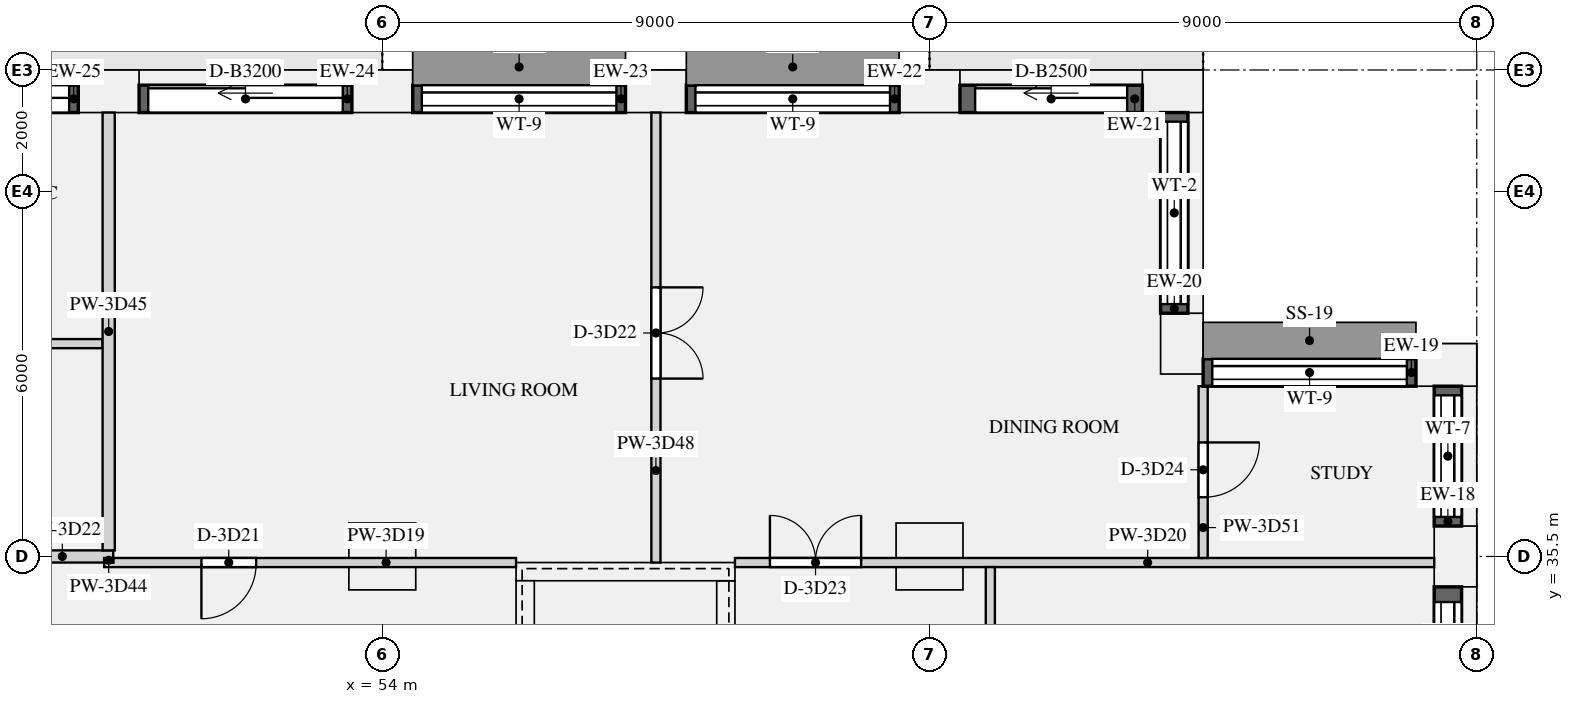
"""IFC4 building model, lengths in metres.
Left out: names, types, materials, properties, quantities, classifications, styles, units other than length and angle.
Written with IfcOpenShell. Run it as: python <this file> out.ifc"""

import sys

from ifc_helpers import new_model, si_unit, direction, frame, frame_2d, origin, origin_2d, place, context, subcontext, project, spatial, rectangle, extrude, element, fill, save


model = new_model("IFC4")
c1 = context("Model", 3, precision=1e-05, world=origin(), true_north=direction((0.0, 1.0)))
c2 = subcontext(c1, "Body", "Model", "MODEL_VIEW")
j1 = project(units=[si_unit("LENGTHUNIT", "METRE"), si_unit("PLANEANGLEUNIT", "RADIAN")], contexts=[c1])
p1 = place(None, origin())
s1 = spatial("IfcSite", under=j1, at=p1, CompositionType="ELEMENT")
p2 = place(p1, origin())
s2 = spatial("IfcBuilding", under=s1, at=p2, CompositionType="ELEMENT")
p3 = place(p2, frame((0.0, 0.0, 166.5)))
s3 = spatial("IfcBuildingStorey", under=s2, at=p3, CompositionType="ELEMENT", Elevation=166.5)
for number, where, z_axis, x_axis in (
    (1, (71.65, 35.5, 0.0), (0.0, 0.0, 1.0), (0.0, 1.0, 0.0)),
    (2, (71.5, 38.65, 0.0), (0.0, 0.0, 1.0), (-1.0, 0.0, 0.0)),
    (3, (67.15, 39.0, 0.0), (0.0, 0.0, 1.0), (0.0, 1.0, 0.0)),
    (4, (67.0, 43.15, 0.0), (0.0, 0.0, 1.0), (-1.0, 0.0, 0.0)),
    (5, (63.0, 43.15, 0.0), (0.0, 0.0, 1.0), (-1.0, 0.0, 0.0)),
    (6, (58.5, 43.15, 0.0), (0.0, 0.0, 1.0), (-1.0, 0.0, 0.0)),
    (7, (54.0, 43.15, 0.0), (0.0, 0.0, 1.0), (-1.0, 0.0, 0.0)),
    (8, (49.5, 43.15, 0.0), (0.0, 0.0, 1.0), (-1.0, 0.0, 0.0)),
):
    element("IfcColumn", number, at=place(p3, frame(where, z_axis=z_axis, x_axis=x_axis)), inside=s3, PredefinedType="USERDEFINED", context=c2, shape_type="SweptSolid", body=[
        extrude(rectangle(XDim=1.0, YDim=0.7, at=origin_2d()), origin(), (0.0, 0.0, 1.0), 3.15),
    ])
for number, where, z_axis, x_axis in (
    (9, (54.0, 35.5, 0.0), (0.0, 0.0, 1.0), (1.0, 0.0, 0.0)),
    (10, (63.0, 35.5, 0.0), (0.0, 0.0, 1.0), (1.0, 0.0, 0.0)),
):
    element("IfcColumn", number, at=place(p3, frame(where, z_axis=z_axis, x_axis=x_axis)), inside=s3, PredefinedType="COLUMN", context=c2, shape_type="SweptSolid", body=[
        extrude(rectangle(XDim=1.1, YDim=1.1, at=origin_2d()), origin(), (0.0, 0.0, 1.0), 3.15),
    ])
p4 = place(p3, frame((56.2, 35.25, 0.0), z_axis=(0.0, 0.0, 1.0), x_axis=(1.0, 0.0, 0.0)))
e11 = element("IfcWall", 11, at=p4, inside=s3, PredefinedType="SHEAR", context=c2, shape_type="SweptSolid", body=[
    extrude(rectangle(XDim=3.6, YDim=0.3, at=frame_2d((1.8, 0.0))), origin(), (0.0, 0.0, 1.0), 3.15),
])
for number, where, z_axis, x_axis in (
    (12, (56.35, 27.3, 0.0), (0.0, 0.0, 1.0), (0.0, 1.0, 0.0)),
    (13, (59.65, 27.3, 0.0), (0.0, 0.0, 1.0), (0.0, 1.0, 0.0)),
):
    element("IfcWall", number, at=place(p3, frame(where, z_axis=z_axis, x_axis=x_axis)), inside=s3, PredefinedType="SHEAR", context=c2, shape_type="SweptSolid", body=[
        extrude(rectangle(XDim=7.8, YDim=0.3, at=frame_2d((3.9, 0.0))), origin(), (0.0, 0.0, 1.0), 3.15),
    ])
p5 = place(p3, frame((71.525, 32.5, 0.9), z_axis=(0.0, 0.0, 1.0), x_axis=(0.0, 1.0, 0.0)))
e14 = element("IfcWall", 14, at=p5, inside=s3, PredefinedType="SOLIDWALL", context=c2, shape_type="SweptSolid", body=[
    extrude(rectangle(XDim=2.5, YDim=0.45, at=frame_2d((1.25, 0.0))), origin(), (0.0, 0.0, 1.0), 1.93),
])
p6 = place(p5, frame((0.25, 0.0, 0.15)))
e15 = element("IfcOpeningElement", 15, at=p6, cuts=e14, PredefinedType="OPENING", context=c2, shape_type="SweptSolid", body=[
    extrude(rectangle(XDim=2.0, YDim=1.5, at=frame_2d((1.0, 0.75))), frame((0.0, 0.235, 0.0), z_axis=(0.0, -1.0, 0.0), x_axis=(1.0, 0.0, 0.0)), (0.0, 0.0, 1.0), 0.47),
])
p7 = place(p3, frame((71.525, 36.0, 0.9), z_axis=(0.0, 0.0, 1.0), x_axis=(0.0, 1.0, 0.0)))
e16 = element("IfcWall", 16, at=p7, inside=s3, PredefinedType="SOLIDWALL", context=c2, shape_type="SweptSolid", body=[
    extrude(rectangle(XDim=2.3, YDim=0.45, at=frame_2d((1.15, 0.0))), origin(), (0.0, 0.0, 1.0), 1.93),
])
p8 = place(p7, frame((0.15, 0.0, 0.15)))
e17 = element("IfcOpeningElement", 17, at=p8, cuts=e16, PredefinedType="OPENING", context=c2, shape_type="SweptSolid", body=[
    extrude(rectangle(XDim=2.0, YDim=1.5, at=frame_2d((1.0, 0.75))), frame((0.0, 0.235, 0.0), z_axis=(0.0, -1.0, 0.0), x_axis=(1.0, 0.0, 0.0)), (0.0, 0.0, 1.0), 0.47),
])
p9 = place(p3, frame((71.0, 38.525, 0.9), z_axis=(0.0, 0.0, 1.0), x_axis=(-1.0, 0.0, 0.0)))
e18 = element("IfcWall", 18, at=p9, inside=s3, PredefinedType="SOLIDWALL", context=c2, shape_type="SweptSolid", body=[
    extrude(rectangle(XDim=3.5, YDim=0.45, at=frame_2d((1.75, 0.0))), origin(), (0.0, 0.0, 1.0), 1.93),
])
p10 = place(p9, frame((0.15, 0.0, 0.15)))
e19 = element("IfcOpeningElement", 19, at=p10, cuts=e18, PredefinedType="OPENING", context=c2, shape_type="SweptSolid", body=[
    extrude(rectangle(XDim=3.2, YDim=1.5, at=frame_2d((1.6, 0.75))), frame((0.0, 0.235, 0.0), z_axis=(0.0, -1.0, 0.0), x_axis=(1.0, 0.0, 0.0)), (0.0, 0.0, 1.0), 0.47),
])
p11 = place(p3, frame((67.025, 39.5, 0.9), z_axis=(0.0, 0.0, 1.0), x_axis=(0.0, 1.0, 0.0)))
e20 = element("IfcWall", 20, at=p11, inside=s3, PredefinedType="SOLIDWALL", context=c2, shape_type="SweptSolid", body=[
    extrude(rectangle(XDim=3.3, YDim=0.45, at=frame_2d((1.65, 0.0))), origin(), (0.0, 0.0, 1.0), 1.93),
])
p12 = place(p11, frame((0.15, 0.0, 0.15)))
e21 = element("IfcOpeningElement", 21, at=p12, cuts=e20, PredefinedType="OPENING", context=c2, shape_type="SweptSolid", body=[
    extrude(rectangle(XDim=3.0, YDim=1.5, at=frame_2d((1.5, 0.75))), frame((0.0, 0.235, 0.0), z_axis=(0.0, -1.0, 0.0), x_axis=(1.0, 0.0, 0.0)), (0.0, 0.0, 1.0), 0.47),
])
p13 = place(p3, frame((66.5, 43.025, 0.0), z_axis=(0.0, 0.0, 1.0), x_axis=(-1.0, 0.0, 0.0)))
e22 = element("IfcWall", 22, at=p13, inside=s3, PredefinedType="SOLIDWALL", context=c2, shape_type="SweptSolid", body=[
    extrude(rectangle(XDim=3.0, YDim=0.45, at=frame_2d((1.5, 0.0))), origin(), (0.0, 0.0, 1.0), 2.83),
])
p14 = place(p13, frame((0.25, 0.0, 0.0)))
e23 = element("IfcOpeningElement", 23, at=p14, cuts=e22, PredefinedType="OPENING", context=c2, shape_type="SweptSolid", body=[
    extrude(rectangle(XDim=2.5, YDim=2.3, at=frame_2d((1.25, 1.15))), frame((0.0, 0.235, 0.0), z_axis=(0.0, -1.0, 0.0), x_axis=(1.0, 0.0, 0.0)), (0.0, 0.0, 1.0), 0.47),
])
p15 = place(p3, frame((62.5, 43.025, 0.9), z_axis=(0.0, 0.0, 1.0), x_axis=(-1.0, 0.0, 0.0)))
e24 = element("IfcWall", 24, at=p15, inside=s3, PredefinedType="SOLIDWALL", context=c2, shape_type="SweptSolid", body=[
    extrude(rectangle(XDim=3.5, YDim=0.45, at=frame_2d((1.75, 0.0))), origin(), (0.0, 0.0, 1.0), 1.93),
])
p16 = place(p15, frame((0.15, 0.0, 0.15)))
e25 = element("IfcOpeningElement", 25, at=p16, cuts=e24, PredefinedType="OPENING", context=c2, shape_type="SweptSolid", body=[
    extrude(rectangle(XDim=3.2, YDim=1.5, at=frame_2d((1.6, 0.75))), frame((0.0, 0.235, 0.0), z_axis=(0.0, -1.0, 0.0), x_axis=(1.0, 0.0, 0.0)), (0.0, 0.0, 1.0), 0.47),
])
p17 = place(p3, frame((58.0, 43.025, 0.9), z_axis=(0.0, 0.0, 1.0), x_axis=(-1.0, 0.0, 0.0)))
e26 = element("IfcWall", 26, at=p17, inside=s3, PredefinedType="SOLIDWALL", context=c2, shape_type="SweptSolid", body=[
    extrude(rectangle(XDim=3.5, YDim=0.45, at=frame_2d((1.75, 0.0))), origin(), (0.0, 0.0, 1.0), 1.93),
])
p18 = place(p17, frame((0.15, 0.0, 0.15)))
e27 = element("IfcOpeningElement", 27, at=p18, cuts=e26, PredefinedType="OPENING", context=c2, shape_type="SweptSolid", body=[
    extrude(rectangle(XDim=3.2, YDim=1.5, at=frame_2d((1.6, 0.75))), frame((0.0, 0.235, 0.0), z_axis=(0.0, -1.0, 0.0), x_axis=(1.0, 0.0, 0.0)), (0.0, 0.0, 1.0), 0.47),
])
p19 = place(p3, frame((53.5, 43.025, 0.0), z_axis=(0.0, 0.0, 1.0), x_axis=(-1.0, 0.0, 0.0)))
e28 = element("IfcWall", 28, at=p19, inside=s3, PredefinedType="SOLIDWALL", context=c2, shape_type="SweptSolid", body=[
    extrude(rectangle(XDim=3.5, YDim=0.45, at=frame_2d((1.75, 0.0))), origin(), (0.0, 0.0, 1.0), 2.83),
])
p20 = place(p19, frame((0.15, 0.0, 0.0)))
e29 = element("IfcOpeningElement", 29, at=p20, cuts=e28, PredefinedType="OPENING", context=c2, shape_type="SweptSolid", body=[
    extrude(rectangle(XDim=3.2, YDim=2.3, at=frame_2d((1.6, 1.15))), frame((0.0, 0.235, 0.0), z_axis=(0.0, -1.0, 0.0), x_axis=(1.0, 0.0, 0.0)), (0.0, 0.0, 1.0), 0.47),
])
p21 = place(p3, frame((49.0, 43.025, 0.0), z_axis=(0.0, 0.0, 1.0), x_axis=(-1.0, 0.0, 0.0)))
e30 = element("IfcWall", 30, at=p21, inside=s3, PredefinedType="SOLIDWALL", context=c2, shape_type="SweptSolid", body=[
    extrude(rectangle(XDim=3.5, YDim=0.45, at=frame_2d((1.75, 0.0))), origin(), (0.0, 0.0, 1.0), 2.83),
])
p22 = place(p21, frame((0.15, 0.0, 0.0)))
e31 = element("IfcOpeningElement", 31, at=p22, cuts=e30, PredefinedType="OPENING", context=c2, shape_type="SweptSolid", body=[
    extrude(rectangle(XDim=3.2, YDim=2.3, at=frame_2d((1.6, 1.15))), frame((0.0, 0.235, 0.0), z_axis=(0.0, -1.0, 0.0), x_axis=(1.0, 0.0, 0.0)), (0.0, 0.0, 1.0), 0.47),
])
p23 = place(p3, frame((49.425, 35.4, 0.0), z_axis=(0.0, 0.0, 1.0), x_axis=(1.0, 0.0, 0.0)))
e32 = element("IfcWall", 32, at=p23, inside=s3, PredefinedType="PARTITIONING", context=c2, shape_type="SweptSolid", body=[
    extrude(rectangle(XDim=6.775, YDim=0.15, at=frame_2d((3.387, 0.0))), origin(), (0.0, 0.0, 1.0), 2.83),
])
p24 = place(p23, frame((1.6, 0.0, 0.0)))
e33 = element("IfcOpeningElement", 33, at=p24, cuts=e32, PredefinedType="OPENING", context=c2, shape_type="SweptSolid", body=[
    extrude(rectangle(XDim=0.9, YDim=2.1, at=frame_2d((0.45, 1.05))), frame((0.0, 0.085, 0.0), z_axis=(0.0, -1.0, 0.0), x_axis=(1.0, 0.0, 0.0)), (0.0, 0.0, 1.0), 0.17),
])
p25 = place(p3, frame((59.8, 35.4, 0.0), z_axis=(0.0, 0.0, 1.0), x_axis=(1.0, 0.0, 0.0)))
e34 = element("IfcWall", 34, at=p25, inside=s3, PredefinedType="PARTITIONING", context=c2, shape_type="SweptSolid", body=[
    extrude(rectangle(XDim=11.5, YDim=0.15, at=frame_2d((5.75, 0.0))), origin(), (0.0, 0.0, 1.0), 2.83),
])
p26 = place(p25, frame((0.575, 0.0, 0.0)))
e35 = element("IfcOpeningElement", 35, at=p26, cuts=e34, PredefinedType="OPENING", context=c2, shape_type="SweptSolid", body=[
    extrude(rectangle(XDim=1.5, YDim=2.1, at=frame_2d((0.75, 1.05))), frame((0.0, 0.085, 0.0), z_axis=(0.0, -1.0, 0.0), x_axis=(1.0, 0.0, 0.0)), (0.0, 0.0, 1.0), 0.17),
])
p27 = place(p3, frame((47.9, 35.5, 0.0), z_axis=(0.0, 0.0, 1.0), x_axis=(1.0, 0.0, 0.0)))
e36 = element("IfcWall", 36, at=p27, inside=s3, PredefinedType="PARTITIONING", context=c2, shape_type="SweptSolid", body=[
    extrude(rectangle(XDim=1.675, YDim=0.2, at=frame_2d((0.837, 0.0))), origin(), (0.0, 0.0, 1.0), 2.83),
])
p28 = place(p3, frame((44.925, 39.0, 0.0), z_axis=(0.0, 0.0, 1.0), x_axis=(1.0, 0.0, 0.0)))
e37 = element("IfcWall", 37, at=p28, inside=s3, PredefinedType="PARTITIONING", context=c2, shape_type="SweptSolid", body=[
    extrude(rectangle(XDim=4.475, YDim=0.15, at=frame_2d((2.237, 0.0))), origin(), (0.0, 0.0, 1.0), 2.83),
])
p29 = place(p28, frame((1.875, 0.0, 0.0)))
e38 = element("IfcOpeningElement", 38, at=p29, cuts=e37, PredefinedType="OPENING", context=c2, shape_type="SweptSolid", body=[
    extrude(rectangle(XDim=0.9, YDim=2.1, at=frame_2d((0.45, 1.05))), frame((0.0, 0.085, 0.0), z_axis=(0.0, -1.0, 0.0), x_axis=(1.0, 0.0, 0.0)), (0.0, 0.0, 1.0), 0.17),
])
p30 = place(p3, frame((49.5, 35.4, 0.0), z_axis=(0.0, 0.0, 1.0), x_axis=(0.0, 1.0, 0.0)))
e39 = element("IfcWall", 39, at=p30, inside=s3, PredefinedType="PARTITIONING", context=c2, shape_type="SweptSolid", body=[
    extrude(rectangle(XDim=0.075, YDim=0.15, at=frame_2d((0.038, 0.0))), origin(), (0.0, 0.0, 1.0), 2.83),
])
p31 = place(p3, frame((49.5, 35.6, 0.0), z_axis=(0.0, 0.0, 1.0), x_axis=(0.0, 1.0, 0.0)))
e40 = element("IfcWall", 40, at=p31, inside=s3, PredefinedType="PARTITIONING", context=c2, shape_type="SweptSolid", body=[
    extrude(rectangle(XDim=7.2, YDim=0.2, at=frame_2d((3.6, 0.0))), origin(), (0.0, 0.0, 1.0), 2.83),
])
p32 = place(p3, frame((58.5, 35.4, 0.0), z_axis=(0.0, 0.0, 1.0), x_axis=(0.0, 1.0, 0.0)))
e41 = element("IfcWall", 41, at=p32, inside=s3, PredefinedType="PARTITIONING", context=c2, shape_type="SweptSolid", body=[
    extrude(rectangle(XDim=7.4, YDim=0.15, at=frame_2d((3.7, 0.0))), origin(), (0.0, 0.0, 1.0), 2.83),
])
p33 = place(p32, frame((3.025, 0.0, 0.0)))
e42 = element("IfcOpeningElement", 42, at=p33, cuts=e41, PredefinedType="OPENING", context=c2, shape_type="SweptSolid", body=[
    extrude(rectangle(XDim=1.5, YDim=2.1, at=frame_2d((0.75, 1.05))), frame((0.0, 0.085, 0.0), z_axis=(0.0, -1.0, 0.0), x_axis=(1.0, 0.0, 0.0)), (0.0, 0.0, 1.0), 0.17),
])
p34 = place(p3, frame((67.5, 35.475, 0.0), z_axis=(0.0, 0.0, 1.0), x_axis=(0.0, 1.0, 0.0)))
e43 = element("IfcWall", 43, at=p34, inside=s3, PredefinedType="PARTITIONING", context=c2, shape_type="SweptSolid", body=[
    extrude(rectangle(XDim=2.825, YDim=0.15, at=frame_2d((1.413, 0.0))), origin(), (0.0, 0.0, 1.0), 2.83),
])
p35 = place(p34, frame((1.0, 0.0, 0.0)))
e44 = element("IfcOpeningElement", 44, at=p35, cuts=e43, PredefinedType="OPENING", context=c2, shape_type="SweptSolid", body=[
    extrude(rectangle(XDim=0.9, YDim=2.1, at=frame_2d((0.45, 1.05))), frame((0.0, 0.085, 0.0), z_axis=(0.0, -1.0, 0.0), x_axis=(1.0, 0.0, 0.0)), (0.0, 0.0, 1.0), 0.17),
])
p36 = place(p3, frame((64.0, 12.575, 0.0), z_axis=(0.0, 0.0, 1.0), x_axis=(0.0, 1.0, 0.0)))
e45 = element("IfcWall", 45, at=p36, inside=s3, PredefinedType="PARTITIONING", context=c2, shape_type="SweptSolid", body=[
    extrude(rectangle(XDim=22.75, YDim=0.15, at=frame_2d((11.375, 0.0))), origin(), (0.0, 0.0, 1.0), 2.83),
])
p37 = place(p36, frame((16.55, 0.0, 0.0)))
e46 = element("IfcOpeningElement", 46, at=p37, cuts=e45, PredefinedType="OPENING", context=c2, shape_type="SweptSolid", body=[
    extrude(rectangle(XDim=1.5, YDim=2.1, at=frame_2d((0.75, 1.05))), frame((0.0, 0.085, 0.0), z_axis=(0.0, -1.0, 0.0), x_axis=(1.0, 0.0, 0.0)), (0.0, 0.0, 1.0), 0.17),
])
p38 = place(p36, frame((3.3, 0.0, 0.0)))
e47 = element("IfcOpeningElement", 47, at=p38, cuts=e45, PredefinedType="OPENING", context=c2, shape_type="SweptSolid", body=[
    extrude(rectangle(XDim=1.5, YDim=2.1, at=frame_2d((0.75, 1.05))), frame((0.0, 0.085, 0.0), z_axis=(0.0, -1.0, 0.0), x_axis=(1.0, 0.0, 0.0)), (0.0, 0.0, 1.0), 0.17),
])
p39 = place(p36, frame((9.1, 0.0, 0.0)))
e48 = element("IfcOpeningElement", 48, at=p39, cuts=e45, PredefinedType="OPENING", context=c2, shape_type="SweptSolid", body=[
    extrude(rectangle(XDim=0.9, YDim=2.1, at=frame_2d((0.45, 1.05))), frame((0.0, 0.085, 0.0), z_axis=(0.0, -1.0, 0.0), x_axis=(1.0, 0.0, 0.0)), (0.0, 0.0, 1.0), 0.17),
])
p40 = place(p6, origin())
e49 = element("IfcWindow", 49, at=p40, inside=s3, PartitioningType="SINGLE_PANEL", PredefinedType="WINDOW", context=c2, shape_type="SweptSolid", body=[
    extrude(rectangle(XDim=2.0, YDim=1.5, at=frame_2d((1.0, 0.75))), frame((0.0, -0.065, 0.0), z_axis=(0.0, -1.0, 0.0), x_axis=(1.0, 0.0, 0.0)), (0.0, 0.0, 1.0), 0.06),
])
fill(e15, e49)
p41 = place(p8, origin())
e50 = element("IfcWindow", 50, at=p41, inside=s3, PartitioningType="SINGLE_PANEL", PredefinedType="WINDOW", context=c2, shape_type="SweptSolid", body=[
    extrude(rectangle(XDim=2.0, YDim=1.5, at=frame_2d((1.0, 0.75))), frame((0.0, -0.065, 0.0), z_axis=(0.0, -1.0, 0.0), x_axis=(1.0, 0.0, 0.0)), (0.0, 0.0, 1.0), 0.06),
])
fill(e17, e50)
p42 = place(p10, origin())
e51 = element("IfcWindow", 51, at=p42, inside=s3, PartitioningType="SINGLE_PANEL", PredefinedType="WINDOW", context=c2, shape_type="SweptSolid", body=[
    extrude(rectangle(XDim=3.2, YDim=1.5, at=frame_2d((1.6, 0.75))), frame((0.0, -0.065, 0.0), z_axis=(0.0, -1.0, 0.0), x_axis=(1.0, 0.0, 0.0)), (0.0, 0.0, 1.0), 0.06),
])
fill(e19, e51)
p43 = place(p12, origin())
e52 = element("IfcWindow", 52, at=p43, inside=s3, PartitioningType="SINGLE_PANEL", PredefinedType="WINDOW", context=c2, shape_type="SweptSolid", body=[
    extrude(rectangle(XDim=3.0, YDim=1.5, at=frame_2d((1.5, 0.75))), frame((0.0, -0.065, 0.0), z_axis=(0.0, -1.0, 0.0), x_axis=(1.0, 0.0, 0.0)), (0.0, 0.0, 1.0), 0.06),
])
fill(e21, e52)
p44 = place(p14, origin())
e53 = element("IfcDoor", 53, at=p44, inside=s3, OperationType="SLIDING_TO_LEFT", PredefinedType="DOOR", context=c2, shape_type="SweptSolid", body=[
    extrude(rectangle(XDim=2.5, YDim=2.3, at=frame_2d((1.25, 1.15))), frame((0.0, -0.07, 0.0), z_axis=(0.0, -1.0, 0.0), x_axis=(1.0, 0.0, 0.0)), (0.0, 0.0, 1.0), 0.05),
])
fill(e23, e53)
p45 = place(p16, origin())
e54 = element("IfcWindow", 54, at=p45, inside=s3, PartitioningType="SINGLE_PANEL", PredefinedType="WINDOW", context=c2, shape_type="SweptSolid", body=[
    extrude(rectangle(XDim=3.2, YDim=1.5, at=frame_2d((1.6, 0.75))), frame((0.0, -0.065, 0.0), z_axis=(0.0, -1.0, 0.0), x_axis=(1.0, 0.0, 0.0)), (0.0, 0.0, 1.0), 0.06),
])
fill(e25, e54)
p46 = place(p18, origin())
e55 = element("IfcWindow", 55, at=p46, inside=s3, PartitioningType="SINGLE_PANEL", PredefinedType="WINDOW", context=c2, shape_type="SweptSolid", body=[
    extrude(rectangle(XDim=3.2, YDim=1.5, at=frame_2d((1.6, 0.75))), frame((0.0, -0.065, 0.0), z_axis=(0.0, -1.0, 0.0), x_axis=(1.0, 0.0, 0.0)), (0.0, 0.0, 1.0), 0.06),
])
fill(e27, e55)
p47 = place(p20, origin())
e56 = element("IfcDoor", 56, at=p47, inside=s3, OperationType="SLIDING_TO_LEFT", PredefinedType="DOOR", context=c2, shape_type="SweptSolid", body=[
    extrude(rectangle(XDim=3.2, YDim=2.3, at=frame_2d((1.6, 1.15))), frame((0.0, -0.07, 0.0), z_axis=(0.0, -1.0, 0.0), x_axis=(1.0, 0.0, 0.0)), (0.0, 0.0, 1.0), 0.05),
])
fill(e29, e56)
p48 = place(p22, origin())
e57 = element("IfcDoor", 57, at=p48, inside=s3, OperationType="SLIDING_TO_LEFT", PredefinedType="DOOR", context=c2, shape_type="SweptSolid", body=[
    extrude(rectangle(XDim=3.2, YDim=2.3, at=frame_2d((1.6, 1.15))), frame((0.0, -0.07, 0.0), z_axis=(0.0, -1.0, 0.0), x_axis=(1.0, 0.0, 0.0)), (0.0, 0.0, 1.0), 0.05),
])
fill(e31, e57)
p49 = place(p24, frame((0.9, 0.0, 0.0), z_axis=(0.0, 0.0, 1.0), x_axis=(-1.0, 0.0, 0.0)))
e58 = element("IfcDoor", 58, at=p49, inside=s3, OperationType="SINGLE_SWING_RIGHT", PredefinedType="DOOR", context=c2, shape_type="SweptSolid", body=[
    extrude(rectangle(XDim=0.9, YDim=2.1, at=frame_2d((0.45, 1.05))), frame((0.0, 0.025, 0.0), z_axis=(0.0, -1.0, 0.0), x_axis=(1.0, 0.0, 0.0)), (0.0, 0.0, 1.0), 0.05),
])
fill(e33, e58)
p50 = place(p33, frame((1.5, 0.0, 0.0), z_axis=(0.0, 0.0, 1.0), x_axis=(-1.0, 0.0, 0.0)))
e59 = element("IfcDoor", 59, at=p50, inside=s3, OperationType="DOUBLE_DOOR_SINGLE_SWING", PredefinedType="DOOR", context=c2, shape_type="SweptSolid", body=[
    extrude(rectangle(XDim=1.5, YDim=2.1, at=frame_2d((0.75, 1.05))), frame((0.0, 0.025, 0.0), z_axis=(0.0, -1.0, 0.0), x_axis=(1.0, 0.0, 0.0)), (0.0, 0.0, 1.0), 0.05),
])
fill(e42, e59)
p51 = place(p26, origin())
e60 = element("IfcDoor", 60, at=p51, inside=s3, OperationType="DOUBLE_DOOR_SINGLE_SWING", PredefinedType="DOOR", context=c2, shape_type="SweptSolid", body=[
    extrude(rectangle(XDim=1.5, YDim=2.1, at=frame_2d((0.75, 1.05))), frame((0.0, 0.025, 0.0), z_axis=(0.0, -1.0, 0.0), x_axis=(1.0, 0.0, 0.0)), (0.0, 0.0, 1.0), 0.05),
])
fill(e35, e60)
p52 = place(p35, frame((0.9, 0.0, 0.0), z_axis=(0.0, 0.0, 1.0), x_axis=(-1.0, 0.0, 0.0)))
e61 = element("IfcDoor", 61, at=p52, inside=s3, OperationType="SINGLE_SWING_LEFT", PredefinedType="DOOR", context=c2, shape_type="SweptSolid", body=[
    extrude(rectangle(XDim=0.9, YDim=2.1, at=frame_2d((0.45, 1.05))), frame((0.0, 0.025, 0.0), z_axis=(0.0, -1.0, 0.0), x_axis=(1.0, 0.0, 0.0)), (0.0, 0.0, 1.0), 0.05),
])
fill(e44, e61)
save(model, sys.argv[1])
